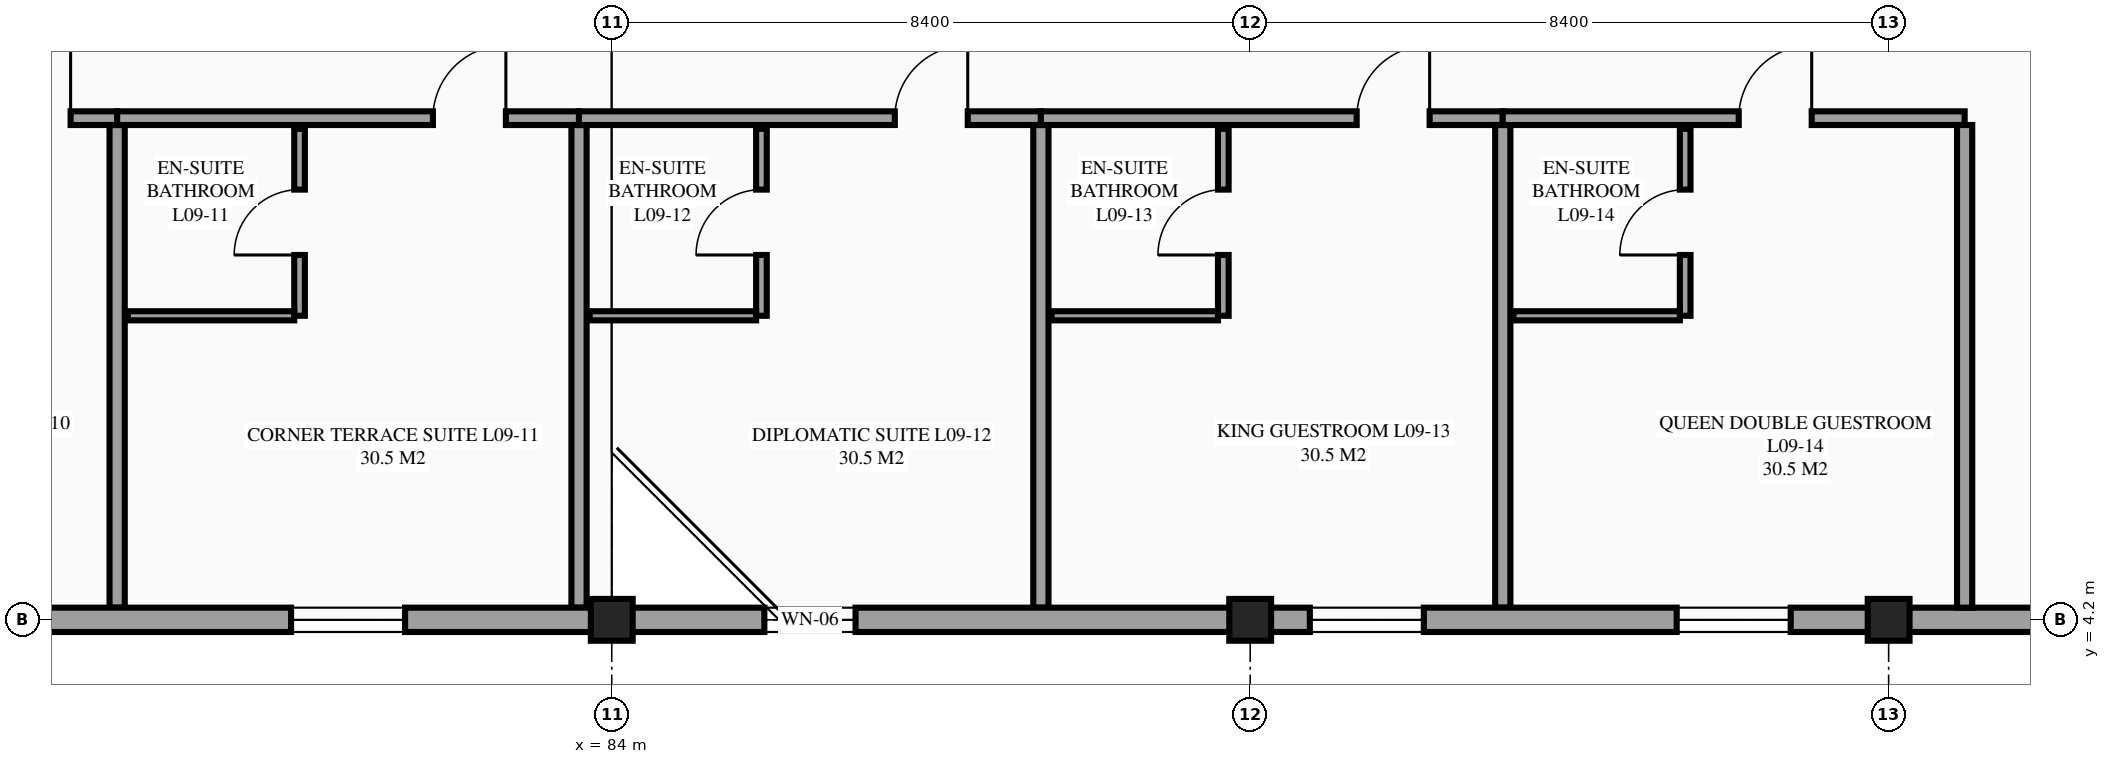
"""IFC4 building model, lengths in metres.
Left out: names, types, materials, properties, quantities, classifications, styles, units other than length and angle.
Written with IfcOpenShell. Run it as: python <this file> out.ifc"""

import sys

from ifc_helpers import new_model, si_unit, direction, frame, frame_2d, origin, origin_2d, place, context, subcontext, project, spatial, rectangle, extrude, element, fill, save


model = new_model("IFC4")
c1 = context("Model", 3, precision=1e-05, world=origin(), true_north=direction((0.0, 1.0)))
c2 = subcontext(c1, "Body", "Model", "MODEL_VIEW")
j1 = project(units=[si_unit("LENGTHUNIT", "METRE"), si_unit("PLANEANGLEUNIT", "RADIAN")], contexts=[c1])
p1 = place(None, origin())
s1 = spatial("IfcSite", under=j1, at=p1, CompositionType="ELEMENT")
p2 = place(p1, origin())
s2 = spatial("IfcBuilding", under=s1, at=p2, CompositionType="ELEMENT")
p3 = place(p2, frame((0.0, 0.0, 36.3)))
s3 = spatial("IfcBuildingStorey", under=s2, at=p3, CompositionType="ELEMENT", Elevation=36.3)
for number, where, z_axis, x_axis in (
    (1, (84.0, 4.2, 0.0), (0.0, 0.0, 1.0), (1.0, 0.0, 0.0)),
    (2, (92.4, 4.2, 0.0), (0.0, 0.0, 1.0), (1.0, 0.0, 0.0)),
    (3, (100.8, 4.2, 0.0), (0.0, 0.0, 1.0), (1.0, 0.0, 0.0)),
):
    element("IfcColumn", number, at=place(p3, frame(where, z_axis=z_axis, x_axis=x_axis)), inside=s3, PredefinedType="COLUMN", context=c2, shape_type="SweptSolid", body=[
        extrude(rectangle(XDim=0.55, YDim=0.55, at=origin_2d()), origin(), (0.0, 0.0, 1.0), 3.6),
    ])
p4 = place(p3, frame((100.8, 4.2, 0.0), z_axis=(0.0, 0.0, 1.0), x_axis=(1.0, 0.0, 0.0)))
e4 = element("IfcWall", 4, at=p4, inside=s3, PredefinedType="STANDARD", context=c2, shape_type="SweptSolid", body=[
    extrude(rectangle(XDim=16.8, YDim=0.32, at=frame_2d((8.4, 0.0))), origin(), (0.0, 0.0, 1.0), 2.53),
])
p5 = place(p4, frame((10.45, 0.0, 0.85)))
e5 = element("IfcOpeningElement", 5, at=p5, cuts=e4, PredefinedType="OPENING", context=c2, shape_type="SweptSolid", body=[
    extrude(rectangle(XDim=1.5, YDim=1.5, at=frame_2d((0.75, 0.75))), frame((0.0, 0.17, 0.0), z_axis=(0.0, -1.0, 0.0), x_axis=(1.0, 0.0, 0.0)), (0.0, 0.0, 1.0), 0.34),
])
p6 = place(p3, frame((71.415, 10.8, 0.0), z_axis=(0.0, 0.0, 1.0), x_axis=(1.0, 0.0, 0.0)))
e6 = element("IfcWall", 6, at=p6, inside=s3, PredefinedType="PARTITIONING", context=c2, shape_type="SweptSolid", body=[
    extrude(rectangle(XDim=6.077, YDim=0.18, at=frame_2d((3.039, 0.0))), origin(), (0.0, 0.0, 1.0), 3.375),
])
p7 = place(p6, frame((4.505, 0.0, 0.0)))
e7 = element("IfcOpeningElement", 7, at=p7, cuts=e6, PredefinedType="OPENING", context=c2, shape_type="SweptSolid", body=[
    extrude(rectangle(XDim=0.96, YDim=2.15, at=frame_2d((0.48, 1.075))), frame((0.0, 0.1, 0.0), z_axis=(0.0, -1.0, 0.0), x_axis=(1.0, 0.0, 0.0)), (0.0, 0.0, 1.0), 0.2),
])
p8 = place(p3, frame((77.492, 4.36, 0.0), z_axis=(0.0, 0.0, 1.0), x_axis=(0.0, 1.0, 0.0)))
e8 = element("IfcWall", 8, at=p8, inside=s3, PredefinedType="PARTITIONING", context=c2, shape_type="SweptSolid", body=[
    extrude(rectangle(XDim=6.35, YDim=0.2, at=frame_2d((3.175, 0.0))), origin(), (0.0, 0.0, 1.0), 3.375),
])
p9 = place(p3, frame((77.492, 10.8, 0.0), z_axis=(0.0, 0.0, 1.0), x_axis=(1.0, 0.0, 0.0)))
e9 = element("IfcWall", 9, at=p9, inside=s3, PredefinedType="PARTITIONING", context=c2, shape_type="SweptSolid", body=[
    extrude(rectangle(XDim=6.077, YDim=0.18, at=frame_2d((3.039, 0.0))), origin(), (0.0, 0.0, 1.0), 3.375),
])
p10 = place(p9, frame((4.155, 0.0, 0.0)))
e10 = element("IfcOpeningElement", 10, at=p10, cuts=e9, PredefinedType="OPENING", context=c2, shape_type="SweptSolid", body=[
    extrude(rectangle(XDim=0.96, YDim=2.15, at=frame_2d((0.48, 1.075))), frame((0.0, 0.1, 0.0), z_axis=(0.0, -1.0, 0.0), x_axis=(1.0, 0.0, 0.0)), (0.0, 0.0, 1.0), 0.2),
])
p11 = place(p3, frame((83.569, 4.36, 0.0), z_axis=(0.0, 0.0, 1.0), x_axis=(0.0, 1.0, 0.0)))
e11 = element("IfcWall", 11, at=p11, inside=s3, PredefinedType="PARTITIONING", context=c2, shape_type="SweptSolid", body=[
    extrude(rectangle(XDim=6.35, YDim=0.2, at=frame_2d((3.175, 0.0))), origin(), (0.0, 0.0, 1.0), 3.375),
])
p12 = place(p3, frame((79.892, 8.2, 0.0), z_axis=(0.0, 0.0, 1.0), x_axis=(0.0, 1.0, 0.0)))
e12 = element("IfcWall", 12, at=p12, inside=s3, PredefinedType="PARTITIONING", context=c2, shape_type="SweptSolid", body=[
    extrude(rectangle(XDim=2.46, YDim=0.14, at=frame_2d((1.23, 0.0))), origin(), (0.0, 0.0, 1.0), 3.375),
])
p13 = place(p12, frame((0.8, 0.0, 0.0)))
e13 = element("IfcOpeningElement", 13, at=p13, cuts=e12, PredefinedType="OPENING", context=c2, shape_type="SweptSolid", body=[
    extrude(rectangle(XDim=0.86, YDim=2.1, at=frame_2d((0.43, 1.05))), frame((0.0, 0.08, 0.0), z_axis=(0.0, -1.0, 0.0), x_axis=(1.0, 0.0, 0.0)), (0.0, 0.0, 1.0), 0.16),
])
p14 = place(p3, frame((77.632, 8.2, 0.0), z_axis=(0.0, 0.0, 1.0), x_axis=(1.0, 0.0, 0.0)))
e14 = element("IfcWall", 14, at=p14, inside=s3, PredefinedType="PARTITIONING", context=c2, shape_type="SweptSolid", body=[
    extrude(rectangle(XDim=2.19, YDim=0.12, at=frame_2d((1.095, 0.0))), origin(), (0.0, 0.0, 1.0), 3.375),
])
p15 = place(p3, frame((83.569, 10.8, 0.0), z_axis=(0.0, 0.0, 1.0), x_axis=(1.0, 0.0, 0.0)))
e15 = element("IfcWall", 15, at=p15, inside=s3, PredefinedType="PARTITIONING", context=c2, shape_type="SweptSolid", body=[
    extrude(rectangle(XDim=6.077, YDim=0.18, at=frame_2d((3.039, 0.0))), origin(), (0.0, 0.0, 1.0), 3.375),
])
p16 = place(p15, frame((4.155, 0.0, 0.0)))
e16 = element("IfcOpeningElement", 16, at=p16, cuts=e15, PredefinedType="OPENING", context=c2, shape_type="SweptSolid", body=[
    extrude(rectangle(XDim=0.96, YDim=2.15, at=frame_2d((0.48, 1.075))), frame((0.0, 0.1, 0.0), z_axis=(0.0, -1.0, 0.0), x_axis=(1.0, 0.0, 0.0)), (0.0, 0.0, 1.0), 0.2),
])
p17 = place(p3, frame((89.646, 4.36, 0.0), z_axis=(0.0, 0.0, 1.0), x_axis=(0.0, 1.0, 0.0)))
e17 = element("IfcWall", 17, at=p17, inside=s3, PredefinedType="PARTITIONING", context=c2, shape_type="SweptSolid", body=[
    extrude(rectangle(XDim=6.35, YDim=0.2, at=frame_2d((3.175, 0.0))), origin(), (0.0, 0.0, 1.0), 3.375),
])
p18 = place(p3, frame((85.969, 8.2, 0.0), z_axis=(0.0, 0.0, 1.0), x_axis=(0.0, 1.0, 0.0)))
e18 = element("IfcWall", 18, at=p18, inside=s3, PredefinedType="PARTITIONING", context=c2, shape_type="SweptSolid", body=[
    extrude(rectangle(XDim=2.46, YDim=0.14, at=frame_2d((1.23, 0.0))), origin(), (0.0, 0.0, 1.0), 3.375),
])
p19 = place(p18, frame((0.8, 0.0, 0.0)))
e19 = element("IfcOpeningElement", 19, at=p19, cuts=e18, PredefinedType="OPENING", context=c2, shape_type="SweptSolid", body=[
    extrude(rectangle(XDim=0.86, YDim=2.1, at=frame_2d((0.43, 1.05))), frame((0.0, 0.08, 0.0), z_axis=(0.0, -1.0, 0.0), x_axis=(1.0, 0.0, 0.0)), (0.0, 0.0, 1.0), 0.16),
])
p20 = place(p3, frame((83.709, 8.2, 0.0), z_axis=(0.0, 0.0, 1.0), x_axis=(1.0, 0.0, 0.0)))
e20 = element("IfcWall", 20, at=p20, inside=s3, PredefinedType="PARTITIONING", context=c2, shape_type="SweptSolid", body=[
    extrude(rectangle(XDim=2.19, YDim=0.12, at=frame_2d((1.095, 0.0))), origin(), (0.0, 0.0, 1.0), 3.375),
])
p21 = place(p3, frame((89.646, 10.8, 0.0), z_axis=(0.0, 0.0, 1.0), x_axis=(1.0, 0.0, 0.0)))
e21 = element("IfcWall", 21, at=p21, inside=s3, PredefinedType="PARTITIONING", context=c2, shape_type="SweptSolid", body=[
    extrude(rectangle(XDim=6.077, YDim=0.18, at=frame_2d((3.039, 0.0))), origin(), (0.0, 0.0, 1.0), 3.375),
])
p22 = place(p21, frame((4.155, 0.0, 0.0)))
e22 = element("IfcOpeningElement", 22, at=p22, cuts=e21, PredefinedType="OPENING", context=c2, shape_type="SweptSolid", body=[
    extrude(rectangle(XDim=0.96, YDim=2.15, at=frame_2d((0.48, 1.075))), frame((0.0, 0.1, 0.0), z_axis=(0.0, -1.0, 0.0), x_axis=(1.0, 0.0, 0.0)), (0.0, 0.0, 1.0), 0.2),
])
p23 = place(p3, frame((95.723, 4.36, 0.0), z_axis=(0.0, 0.0, 1.0), x_axis=(0.0, 1.0, 0.0)))
e23 = element("IfcWall", 23, at=p23, inside=s3, PredefinedType="PARTITIONING", context=c2, shape_type="SweptSolid", body=[
    extrude(rectangle(XDim=6.35, YDim=0.2, at=frame_2d((3.175, 0.0))), origin(), (0.0, 0.0, 1.0), 3.375),
])
p24 = place(p3, frame((92.046, 8.2, 0.0), z_axis=(0.0, 0.0, 1.0), x_axis=(0.0, 1.0, 0.0)))
e24 = element("IfcWall", 24, at=p24, inside=s3, PredefinedType="PARTITIONING", context=c2, shape_type="SweptSolid", body=[
    extrude(rectangle(XDim=2.46, YDim=0.14, at=frame_2d((1.23, 0.0))), origin(), (0.0, 0.0, 1.0), 3.375),
])
p25 = place(p24, frame((0.8, 0.0, 0.0)))
e25 = element("IfcOpeningElement", 25, at=p25, cuts=e24, PredefinedType="OPENING", context=c2, shape_type="SweptSolid", body=[
    extrude(rectangle(XDim=0.86, YDim=2.1, at=frame_2d((0.43, 1.05))), frame((0.0, 0.08, 0.0), z_axis=(0.0, -1.0, 0.0), x_axis=(1.0, 0.0, 0.0)), (0.0, 0.0, 1.0), 0.16),
])
p26 = place(p3, frame((89.786, 8.2, 0.0), z_axis=(0.0, 0.0, 1.0), x_axis=(1.0, 0.0, 0.0)))
e26 = element("IfcWall", 26, at=p26, inside=s3, PredefinedType="PARTITIONING", context=c2, shape_type="SweptSolid", body=[
    extrude(rectangle(XDim=2.19, YDim=0.12, at=frame_2d((1.095, 0.0))), origin(), (0.0, 0.0, 1.0), 3.375),
])
p27 = place(p3, frame((95.723, 10.8, 0.0), z_axis=(0.0, 0.0, 1.0), x_axis=(1.0, 0.0, 0.0)))
e27 = element("IfcWall", 27, at=p27, inside=s3, PredefinedType="PARTITIONING", context=c2, shape_type="SweptSolid", body=[
    extrude(rectangle(XDim=6.077, YDim=0.18, at=frame_2d((3.039, 0.0))), origin(), (0.0, 0.0, 1.0), 3.375),
])
p28 = place(p27, frame((3.105, 0.0, 0.0)))
e28 = element("IfcOpeningElement", 28, at=p28, cuts=e27, PredefinedType="OPENING", context=c2, shape_type="SweptSolid", body=[
    extrude(rectangle(XDim=0.96, YDim=2.15, at=frame_2d((0.48, 1.075))), frame((0.0, 0.1, 0.0), z_axis=(0.0, -1.0, 0.0), x_axis=(1.0, 0.0, 0.0)), (0.0, 0.0, 1.0), 0.2),
])
p29 = place(p3, frame((101.8, 4.36, 0.0), z_axis=(0.0, 0.0, 1.0), x_axis=(0.0, 1.0, 0.0)))
e29 = element("IfcWall", 29, at=p29, inside=s3, PredefinedType="PARTITIONING", context=c2, shape_type="SweptSolid", body=[
    extrude(rectangle(XDim=6.35, YDim=0.2, at=frame_2d((3.175, 0.0))), origin(), (0.0, 0.0, 1.0), 3.375),
])
p30 = place(p3, frame((98.123, 8.2, 0.0), z_axis=(0.0, 0.0, 1.0), x_axis=(0.0, 1.0, 0.0)))
e30 = element("IfcWall", 30, at=p30, inside=s3, PredefinedType="PARTITIONING", context=c2, shape_type="SweptSolid", body=[
    extrude(rectangle(XDim=2.46, YDim=0.14, at=frame_2d((1.23, 0.0))), origin(), (0.0, 0.0, 1.0), 3.375),
])
p31 = place(p30, frame((0.8, 0.0, 0.0)))
e31 = element("IfcOpeningElement", 31, at=p31, cuts=e30, PredefinedType="OPENING", context=c2, shape_type="SweptSolid", body=[
    extrude(rectangle(XDim=0.86, YDim=2.1, at=frame_2d((0.43, 1.05))), frame((0.0, 0.08, 0.0), z_axis=(0.0, -1.0, 0.0), x_axis=(1.0, 0.0, 0.0)), (0.0, 0.0, 1.0), 0.16),
])
p32 = place(p3, frame((95.863, 8.2, 0.0), z_axis=(0.0, 0.0, 1.0), x_axis=(1.0, 0.0, 0.0)))
e32 = element("IfcWall", 32, at=p32, inside=s3, PredefinedType="PARTITIONING", context=c2, shape_type="SweptSolid", body=[
    extrude(rectangle(XDim=2.19, YDim=0.12, at=frame_2d((1.095, 0.0))), origin(), (0.0, 0.0, 1.0), 3.375),
])
p33 = place(p3, frame((75.6, 4.2, 0.0), z_axis=(0.0, 0.0, 1.0), x_axis=(1.0, 0.0, 0.0)))
e33 = element("IfcWall", 33, at=p33, inside=s3, PredefinedType="STANDARD", context=c2, shape_type="SweptSolid", body=[
    extrude(rectangle(XDim=8.4, YDim=0.32, at=frame_2d((4.2, 0.0))), origin(), (0.0, 0.0, 1.0), 2.43),
])
p34 = place(p33, frame((4.181, 0.0, 0.85)))
e34 = element("IfcOpeningElement", 34, at=p34, cuts=e33, PredefinedType="OPENING", context=c2, shape_type="SweptSolid", body=[
    extrude(rectangle(XDim=1.5, YDim=1.5, at=frame_2d((0.75, 0.75))), frame((0.0, 0.17, 0.0), z_axis=(0.0, -1.0, 0.0), x_axis=(1.0, 0.0, 0.0)), (0.0, 0.0, 1.0), 0.34),
])
p35 = place(p3, frame((84.0, 4.2, 0.0), z_axis=(0.0, 0.0, 1.0), x_axis=(1.0, 0.0, 0.0)))
e35 = element("IfcWall", 35, at=p35, inside=s3, PredefinedType="STANDARD", context=c2, shape_type="SweptSolid", body=[
    extrude(rectangle(XDim=8.4, YDim=0.32, at=frame_2d((4.2, 0.0))), origin(), (0.0, 0.0, 1.0), 2.53),
])
p36 = place(p35, frame((2.008, 0.0, 0.85)))
e36 = element("IfcOpeningElement", 36, at=p36, cuts=e35, PredefinedType="OPENING", context=c2, shape_type="SweptSolid", body=[
    extrude(rectangle(XDim=1.2, YDim=1.5, at=frame_2d((0.6, 0.75))), frame((0.0, 0.17, 0.0), z_axis=(0.0, -1.0, 0.0), x_axis=(1.0, 0.0, 0.0)), (0.0, 0.0, 1.0), 0.34),
])
p37 = place(p3, frame((92.4, 4.2, 0.0), z_axis=(0.0, 0.0, 1.0), x_axis=(1.0, 0.0, 0.0)))
e37 = element("IfcWall", 37, at=p37, inside=s3, PredefinedType="STANDARD", context=c2, shape_type="SweptSolid", body=[
    extrude(rectangle(XDim=8.4, YDim=0.32, at=frame_2d((4.2, 0.0))), origin(), (0.0, 0.0, 1.0), 3.133),
])
p38 = place(p37, frame((0.785, 0.0, 0.85)))
e38 = element("IfcOpeningElement", 38, at=p38, cuts=e37, PredefinedType="OPENING", context=c2, shape_type="SweptSolid", body=[
    extrude(rectangle(XDim=1.5, YDim=1.5, at=frame_2d((0.75, 0.75))), frame((0.0, 0.17, 0.0), z_axis=(0.0, -1.0, 0.0), x_axis=(1.0, 0.0, 0.0)), (0.0, 0.0, 1.0), 0.34),
])
p39 = place(p37, frame((5.612, 0.0, 0.85)))
e39 = element("IfcOpeningElement", 39, at=p39, cuts=e37, PredefinedType="OPENING", context=c2, shape_type="SweptSolid", body=[
    extrude(rectangle(XDim=1.5, YDim=1.5, at=frame_2d((0.75, 0.75))), frame((0.0, 0.17, 0.0), z_axis=(0.0, -1.0, 0.0), x_axis=(1.0, 0.0, 0.0)), (0.0, 0.0, 1.0), 0.34),
])
p40 = place(p34, origin())
e40 = element("IfcWindow", 40, at=p40, inside=s3, PartitioningType="SINGLE_PANEL", PredefinedType="WINDOW", context=c2, shape_type="SweptSolid", body=[
    extrude(rectangle(XDim=1.5, YDim=1.5, at=frame_2d((0.75, 0.75))), frame((0.0, 0.03, 0.0), z_axis=(0.0, -1.0, 0.0), x_axis=(1.0, 0.0, 0.0)), (0.0, 0.0, 1.0), 0.06),
])
fill(e34, e40)
p41 = place(p36, origin())
e41 = element("IfcWindow", 41, at=p41, inside=s3, PartitioningType="SINGLE_PANEL", PredefinedType="WINDOW", context=c2, shape_type="SweptSolid", body=[
    extrude(rectangle(XDim=1.2, YDim=1.5, at=frame_2d((0.6, 0.75))), frame((0.0, 0.03, 0.0), z_axis=(0.0, -1.0, 0.0), x_axis=(1.0, 0.0, 0.0)), (0.0, 0.0, 1.0), 0.06),
])
fill(e36, e41)
p42 = place(p38, origin())
e42 = element("IfcWindow", 42, at=p42, inside=s3, PartitioningType="SINGLE_PANEL", PredefinedType="WINDOW", context=c2, shape_type="SweptSolid", body=[
    extrude(rectangle(XDim=1.5, YDim=1.5, at=frame_2d((0.75, 0.75))), frame((0.0, 0.03, 0.0), z_axis=(0.0, -1.0, 0.0), x_axis=(1.0, 0.0, 0.0)), (0.0, 0.0, 1.0), 0.06),
])
fill(e38, e42)
p43 = place(p39, origin())
e43 = element("IfcWindow", 43, at=p43, inside=s3, PartitioningType="SINGLE_PANEL", PredefinedType="WINDOW", context=c2, shape_type="SweptSolid", body=[
    extrude(rectangle(XDim=1.5, YDim=1.5, at=frame_2d((0.75, 0.75))), frame((0.0, 0.03, 0.0), z_axis=(0.0, -1.0, 0.0), x_axis=(1.0, 0.0, 0.0)), (0.0, 0.0, 1.0), 0.06),
])
fill(e39, e43)
p44 = place(p7, origin())
e44 = element("IfcDoor", 44, at=p44, inside=s3, OperationType="SINGLE_SWING_RIGHT", PredefinedType="DOOR", context=c2, shape_type="SweptSolid", body=[
    extrude(rectangle(XDim=0.96, YDim=2.15, at=frame_2d((0.48, 1.075))), frame((0.0, 0.025, 0.0), z_axis=(0.0, -1.0, 0.0), x_axis=(1.0, 0.0, 0.0)), (0.0, 0.0, 1.0), 0.05),
])
fill(e7, e44)
p45 = place(p10, origin())
e45 = element("IfcDoor", 45, at=p45, inside=s3, OperationType="SINGLE_SWING_RIGHT", PredefinedType="DOOR", context=c2, shape_type="SweptSolid", body=[
    extrude(rectangle(XDim=0.96, YDim=2.15, at=frame_2d((0.48, 1.075))), frame((0.0, 0.025, 0.0), z_axis=(0.0, -1.0, 0.0), x_axis=(1.0, 0.0, 0.0)), (0.0, 0.0, 1.0), 0.05),
])
fill(e10, e45)
p46 = place(p13, origin())
e46 = element("IfcDoor", 46, at=p46, inside=s3, OperationType="SINGLE_SWING_LEFT", PredefinedType="DOOR", context=c2, shape_type="SweptSolid", body=[
    extrude(rectangle(XDim=0.86, YDim=2.1, at=frame_2d((0.43, 1.05))), frame((0.0, 0.025, 0.0), z_axis=(0.0, -1.0, 0.0), x_axis=(1.0, 0.0, 0.0)), (0.0, 0.0, 1.0), 0.05),
])
fill(e13, e46)
p47 = place(p16, origin())
e47 = element("IfcDoor", 47, at=p47, inside=s3, OperationType="SINGLE_SWING_RIGHT", PredefinedType="DOOR", context=c2, shape_type="SweptSolid", body=[
    extrude(rectangle(XDim=0.96, YDim=2.15, at=frame_2d((0.48, 1.075))), frame((0.0, 0.025, 0.0), z_axis=(0.0, -1.0, 0.0), x_axis=(1.0, 0.0, 0.0)), (0.0, 0.0, 1.0), 0.05),
])
fill(e16, e47)
p48 = place(p19, origin())
e48 = element("IfcDoor", 48, at=p48, inside=s3, OperationType="SINGLE_SWING_LEFT", PredefinedType="DOOR", context=c2, shape_type="SweptSolid", body=[
    extrude(rectangle(XDim=0.86, YDim=2.1, at=frame_2d((0.43, 1.05))), frame((0.0, 0.025, 0.0), z_axis=(0.0, -1.0, 0.0), x_axis=(1.0, 0.0, 0.0)), (0.0, 0.0, 1.0), 0.05),
])
fill(e19, e48)
p49 = place(p22, origin())
e49 = element("IfcDoor", 49, at=p49, inside=s3, OperationType="SINGLE_SWING_RIGHT", PredefinedType="DOOR", context=c2, shape_type="SweptSolid", body=[
    extrude(rectangle(XDim=0.96, YDim=2.15, at=frame_2d((0.48, 1.075))), frame((0.0, 0.025, 0.0), z_axis=(0.0, -1.0, 0.0), x_axis=(1.0, 0.0, 0.0)), (0.0, 0.0, 1.0), 0.05),
])
fill(e22, e49)
p50 = place(p25, origin())
e50 = element("IfcDoor", 50, at=p50, inside=s3, OperationType="SINGLE_SWING_LEFT", PredefinedType="DOOR", context=c2, shape_type="SweptSolid", body=[
    extrude(rectangle(XDim=0.86, YDim=2.1, at=frame_2d((0.43, 1.05))), frame((0.0, 0.025, 0.0), z_axis=(0.0, -1.0, 0.0), x_axis=(1.0, 0.0, 0.0)), (0.0, 0.0, 1.0), 0.05),
])
fill(e25, e50)
p51 = place(p28, origin())
e51 = element("IfcDoor", 51, at=p51, inside=s3, OperationType="SINGLE_SWING_RIGHT", PredefinedType="DOOR", context=c2, shape_type="SweptSolid", body=[
    extrude(rectangle(XDim=0.96, YDim=2.15, at=frame_2d((0.48, 1.075))), frame((0.0, 0.025, 0.0), z_axis=(0.0, -1.0, 0.0), x_axis=(1.0, 0.0, 0.0)), (0.0, 0.0, 1.0), 0.05),
])
fill(e28, e51)
p52 = place(p31, origin())
e52 = element("IfcDoor", 52, at=p52, inside=s3, OperationType="SINGLE_SWING_LEFT", PredefinedType="DOOR", context=c2, shape_type="SweptSolid", body=[
    extrude(rectangle(XDim=0.86, YDim=2.1, at=frame_2d((0.43, 1.05))), frame((0.0, 0.025, 0.0), z_axis=(0.0, -1.0, 0.0), x_axis=(1.0, 0.0, 0.0)), (0.0, 0.0, 1.0), 0.05),
])
fill(e31, e52)
save(model, sys.argv[1])
